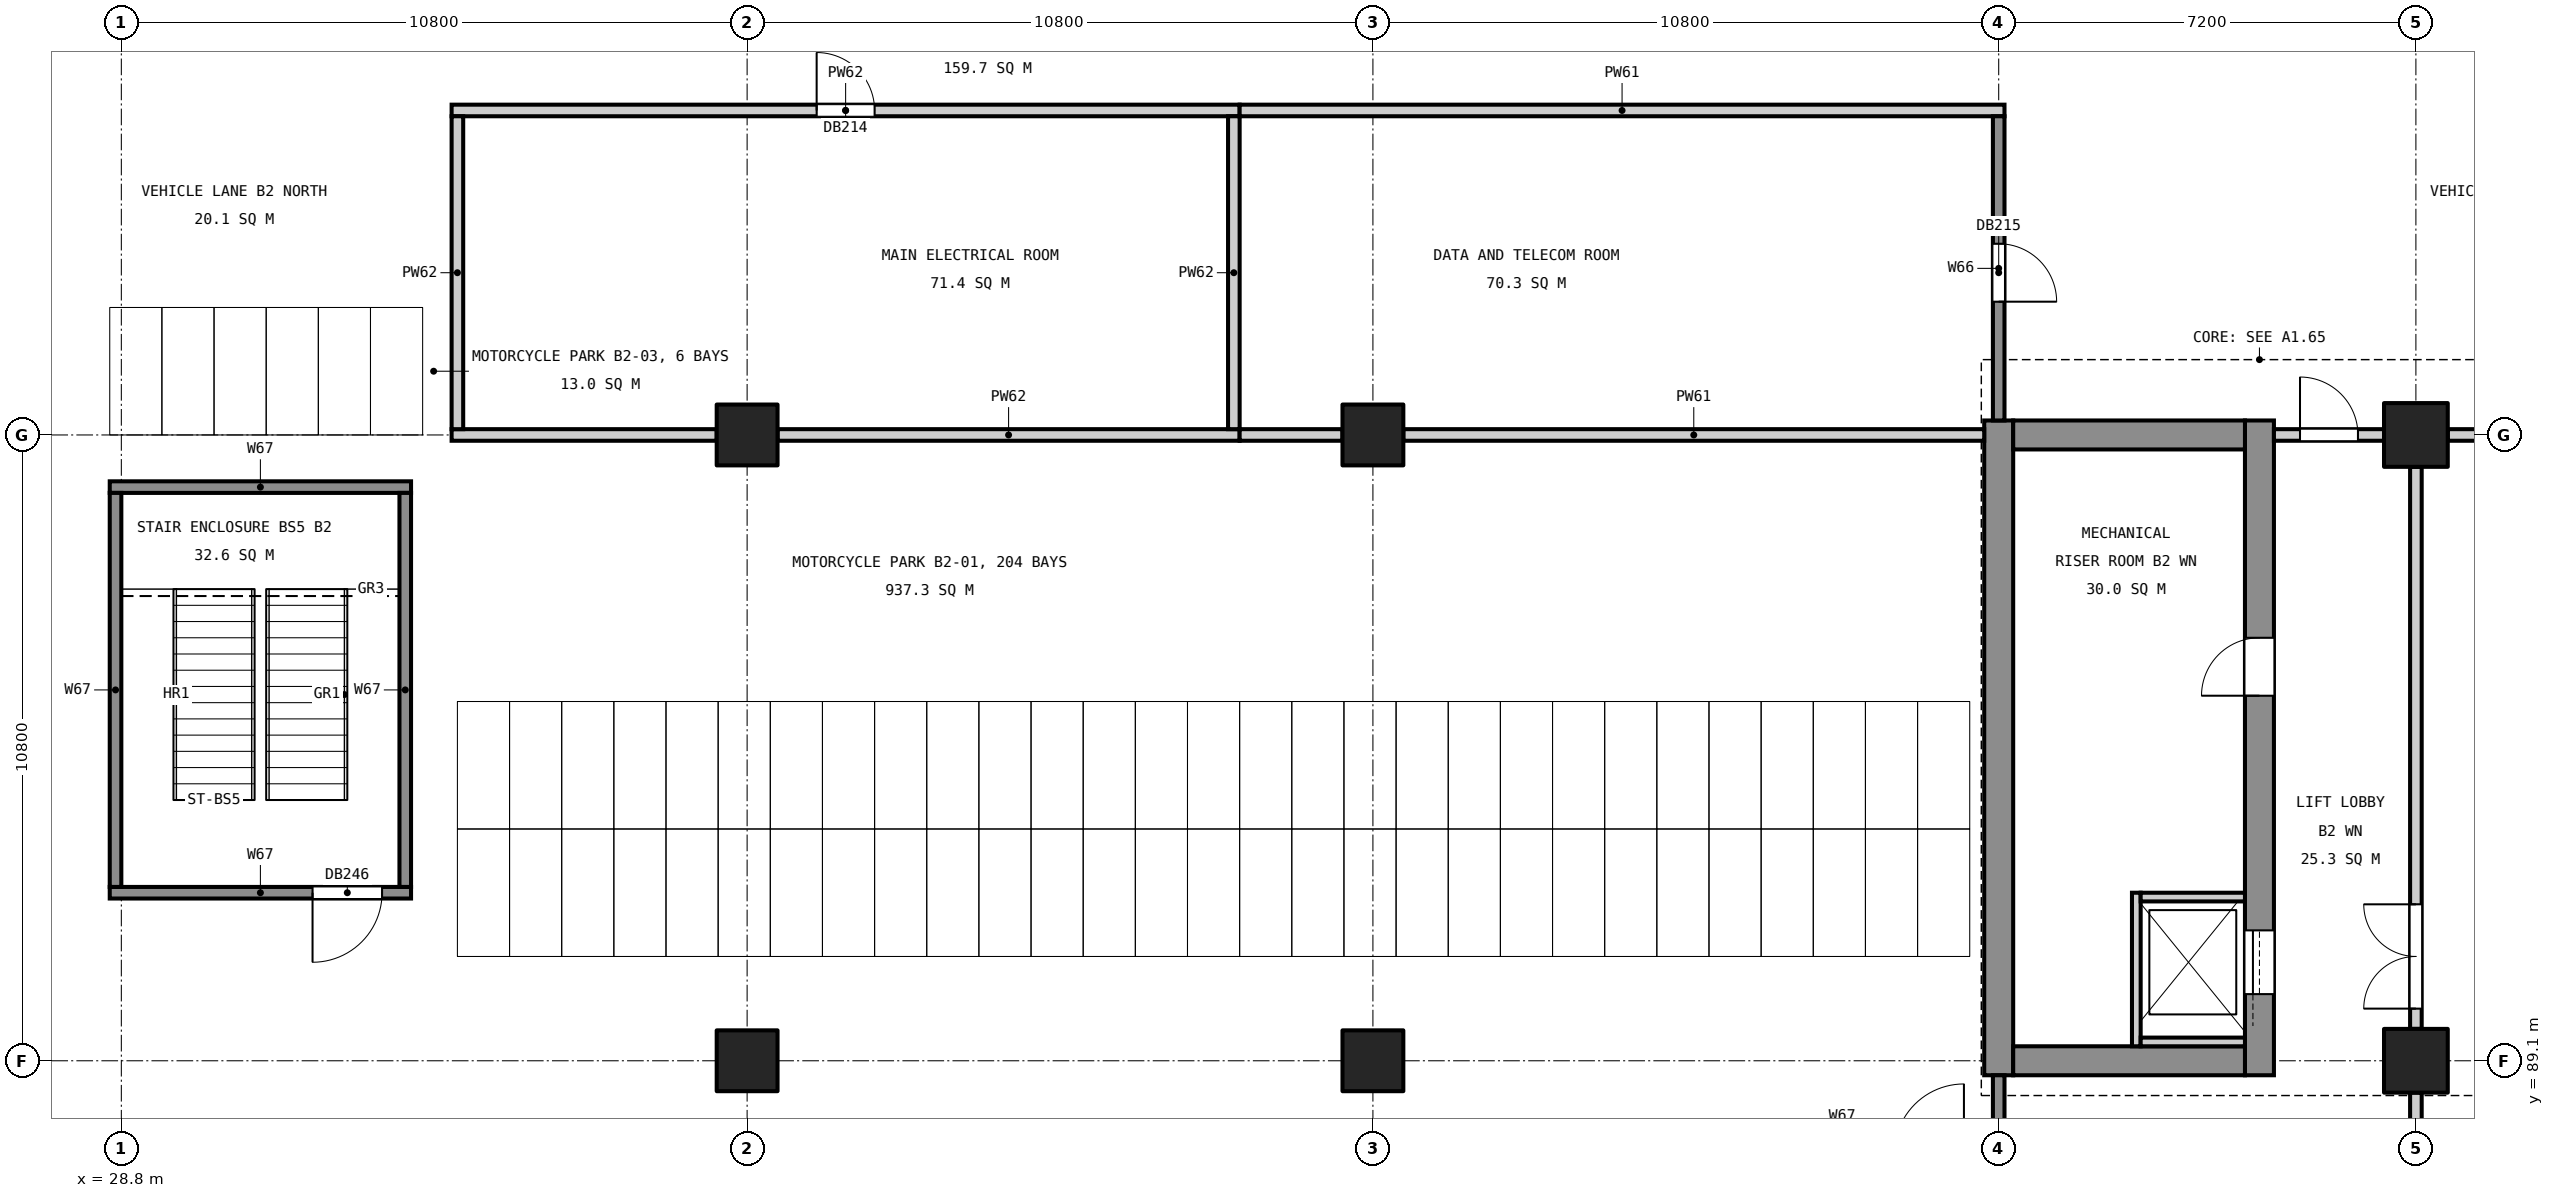
"""IFC4 building model, lengths in metres.
Left out: names, types, materials, properties, quantities, classifications, styles, units other than length and angle.
Written with IfcOpenShell. Run it as: python <this file> out.ifc"""

import sys

from ifc_helpers import new_model, si_unit, direction, frame, frame_2d, origin, origin_2d, place, context, subcontext, project, spatial, rectangle, extrude, element, fill, save


model = new_model("IFC4")
c1 = context("Model", 3, precision=1e-05, world=origin(), true_north=direction((0.0, 1.0)))
c2 = subcontext(c1, "Body", "Model", "MODEL_VIEW")
j1 = project(units=[si_unit("LENGTHUNIT", "METRE"), si_unit("PLANEANGLEUNIT", "RADIAN")], contexts=[c1])
p1 = place(None, origin())
s1 = spatial("IfcSite", under=j1, at=p1, CompositionType="ELEMENT")
p2 = place(p1, origin())
s2 = spatial("IfcBuilding", under=s1, at=p2, CompositionType="ELEMENT")
p3 = place(p2, frame((0.0, 0.0, -9.6)))
s3 = spatial("IfcBuildingStorey", under=s2, at=p3, CompositionType="ELEMENT", Elevation=-9.6)
for number, where, z_axis, x_axis in (
    (1, (68.4, 89.1, 0.0), (0.0, 0.0, 1.0), (1.0, 0.0, 0.0)),
    (2, (68.4, 99.9, 0.0), (0.0, 0.0, 1.0), (1.0, 0.0, 0.0)),
):
    element("IfcColumn", number, at=place(p3, frame(where, z_axis=z_axis, x_axis=x_axis)), inside=s3, PredefinedType="COLUMN", context=c2, shape_type="SweptSolid", body=[
        extrude(rectangle(XDim=1.1, YDim=1.1, at=origin_2d()), origin(), (0.0, 0.0, 1.0), 4.35),
    ])
for number, where, z_axis, x_axis in (
    (3, (39.6, 89.1, 0.0), (0.0, 0.0, 1.0), (1.0, 0.0, 0.0)),
    (4, (39.6, 99.9, 0.0), (0.0, 0.0, 1.0), (1.0, 0.0, 0.0)),
    (5, (50.4, 89.1, 0.0), (0.0, 0.0, 1.0), (1.0, 0.0, 0.0)),
    (6, (50.4, 99.9, 0.0), (0.0, 0.0, 1.0), (1.0, 0.0, 0.0)),
):
    element("IfcColumn", number, at=place(p3, frame(where, z_axis=z_axis, x_axis=x_axis)), inside=s3, PredefinedType="COLUMN", context=c2, shape_type="SweptSolid", body=[
        extrude(rectangle(XDim=1.05, YDim=1.05, at=origin_2d()), origin(), (0.0, 0.0, 1.0), 4.35),
    ])
p4 = place(p3, frame((61.2, 88.85, 0.0), z_axis=(0.0, 0.0, 1.0), x_axis=(0.0, 1.0, 0.0)))
e7 = element("IfcWall", 7, at=p4, inside=s3, PredefinedType="SHEAR", context=c2, shape_type="SweptSolid", body=[
    extrude(rectangle(XDim=11.3, YDim=0.5, at=frame_2d((5.65, 0.0))), origin(), (0.0, 0.0, 1.0), 4.35),
])
p5 = place(p3, frame((65.7, 88.85, 0.0), z_axis=(0.0, 0.0, 1.0), x_axis=(0.0, 1.0, 0.0)))
e8 = element("IfcWall", 8, at=p5, inside=s3, PredefinedType="SHEAR", context=c2, shape_type="SweptSolid", body=[
    extrude(rectangle(XDim=11.3, YDim=0.5, at=frame_2d((5.65, 0.0))), origin(), (0.0, 0.0, 1.0), 4.35),
])
p6 = place(p5, frame((1.4, 0.0, 0.0)))
e9 = element("IfcOpeningElement", 9, at=p6, cuts=e8, PredefinedType="OPENING", context=c2, shape_type="SweptSolid", body=[
    extrude(rectangle(XDim=1.1, YDim=2.1, at=frame_2d((0.55, 1.05))), frame((0.0, 0.26, 0.0), z_axis=(0.0, -1.0, 0.0), x_axis=(1.0, 0.0, 0.0)), (0.0, 0.0, 1.0), 0.52),
])
p7 = place(p5, frame((6.55, 0.0, 0.0)))
e10 = element("IfcOpeningElement", 10, at=p7, cuts=e8, PredefinedType="OPENING", context=c2, shape_type="SweptSolid", body=[
    extrude(rectangle(XDim=1.0, YDim=2.1, at=frame_2d((0.5, 1.05))), frame((0.0, 0.26, 0.0), z_axis=(0.0, -1.0, 0.0), x_axis=(1.0, 0.0, 0.0)), (0.0, 0.0, 1.0), 0.52),
])
for number, where, z_axis, x_axis in (
    (11, (61.45, 89.1, 0.0), (0.0, 0.0, 1.0), (1.0, 0.0, 0.0)),
    (12, (61.45, 99.9, 0.0), (0.0, 0.0, 1.0), (1.0, 0.0, 0.0)),
):
    element("IfcWall", number, at=place(p3, frame(where, z_axis=z_axis, x_axis=x_axis)), inside=s3, PredefinedType="SHEAR", context=c2, shape_type="SweptSolid", body=[
        extrude(rectangle(XDim=4.0, YDim=0.5, at=frame_2d((2.0, 0.0))), origin(), (0.0, 0.0, 1.0), 4.35),
    ])
p8 = place(p2, frame((0.0, 0.0, -4.8)))
s4 = spatial("IfcBuildingStorey", under=s2, at=p8, CompositionType="ELEMENT", Elevation=-4.8)
for number, where, z_axis, x_axis in (
    (13, (28.2, 84.9, -18.2), (0.0, 0.0, 1.0), (0.0, 1.0, 0.0)),
    (14, (28.2, 90.7, -18.2), (0.0, 0.0, 1.0), (0.0, 1.0, 0.0)),
    (15, (28.2, 96.5, -18.2), (0.0, 0.0, 1.0), (0.0, 1.0, 0.0)),
    (16, (28.2, 102.3, -18.2), (0.0, 0.0, 1.0), (0.0, 1.0, 0.0)),
):
    element("IfcWall", number, at=place(p8, frame(where, z_axis=z_axis, x_axis=x_axis)), inside=s4, PredefinedType="SOLIDWALL", context=c2, shape_type="SweptSolid", body=[
        extrude(rectangle(XDim=5.8, YDim=0.8, at=frame_2d((2.9, 0.0))), origin(), (0.0, 0.0, 1.0), 21.55),
    ])
p9 = place(p3, frame((63.575, 92.0, 0.0), z_axis=(0.0, 0.0, 1.0), x_axis=(0.0, -1.0, 0.0)))
e17 = element("IfcWall", 17, at=p9, inside=s3, PredefinedType="SOLIDWALL", context=c2, shape_type="SweptSolid", body=[
    extrude(rectangle(XDim=2.65, YDim=0.15, at=frame_2d((1.325, 0.0))), origin(), (0.0, 0.0, 1.0), 4.8),
])
for number, where, z_axis, x_axis in (
    (18, (63.65, 91.925, 0.0), (0.0, 0.0, 1.0), (1.0, 0.0, 0.0)),
    (19, (63.65, 89.425, 0.0), (0.0, 0.0, 1.0), (1.0, 0.0, 0.0)),
):
    element("IfcWall", number, at=place(p3, frame(where, z_axis=z_axis, x_axis=x_axis)), inside=s3, PredefinedType="SOLIDWALL", context=c2, shape_type="SweptSolid", body=[
        extrude(rectangle(XDim=1.8, YDim=0.15, at=frame_2d((0.9, 0.0))), origin(), (0.0, 0.0, 1.0), 4.8),
    ])
p10 = place(p3, frame((28.6, 92.0, 0.0), z_axis=(0.0, 0.0, 1.0), x_axis=(1.0, 0.0, 0.0)))
e20 = element("IfcWall", 20, at=p10, inside=s3, PredefinedType="SOLIDWALL", context=c2, shape_type="SweptSolid", body=[
    extrude(rectangle(XDim=5.2, YDim=0.2, at=frame_2d((2.6, 0.0))), origin(), (0.0, 0.0, 1.0), 4.35),
])
p11 = place(p10, frame((3.5, 0.0, 0.0)))
e21 = element("IfcOpeningElement", 21, at=p11, cuts=e20, PredefinedType="OPENING", context=c2, shape_type="SweptSolid", body=[
    extrude(rectangle(XDim=1.2, YDim=2.1, at=frame_2d((0.6, 1.05))), frame((0.0, 0.11, 0.0), z_axis=(0.0, -1.0, 0.0), x_axis=(1.0, 0.0, 0.0)), (0.0, 0.0, 1.0), 0.22),
])
p12 = place(p3, frame((28.6, 99.0, 0.0), z_axis=(0.0, 0.0, 1.0), x_axis=(1.0, 0.0, 0.0)))
e22 = element("IfcWall", 22, at=p12, inside=s3, PredefinedType="SOLIDWALL", context=c2, shape_type="SweptSolid", body=[
    extrude(rectangle(XDim=5.2, YDim=0.2, at=frame_2d((2.6, 0.0))), origin(), (0.0, 0.0, 1.0), 4.35),
])
p13 = place(p3, frame((34.5, 99.9, 0.0), z_axis=(0.0, 0.0, 1.0), x_axis=(1.0, 0.0, 0.0)))
e23 = element("IfcWall", 23, at=p13, inside=s3, PredefinedType="PARTITIONING", context=c2, shape_type="SweptSolid", body=[
    extrude(rectangle(XDim=4.575, YDim=0.2, at=frame_2d((2.288, 0.0))), origin(), (0.0, 0.0, 1.0), 4.35),
])
p14 = place(p3, frame((40.125, 99.9, 0.0), z_axis=(0.0, 0.0, 1.0), x_axis=(1.0, 0.0, 0.0)))
e24 = element("IfcWall", 24, at=p14, inside=s3, PredefinedType="PARTITIONING", context=c2, shape_type="SweptSolid", body=[
    extrude(rectangle(XDim=7.975, YDim=0.2, at=frame_2d((3.988, 0.0))), origin(), (0.0, 0.0, 1.0), 4.35),
])
p15 = place(p3, frame((48.1, 99.9, 0.0), z_axis=(0.0, 0.0, 1.0), x_axis=(1.0, 0.0, 0.0)))
e25 = element("IfcWall", 25, at=p15, inside=s3, PredefinedType="PARTITIONING", context=c2, shape_type="SweptSolid", body=[
    extrude(rectangle(XDim=1.775, YDim=0.2, at=frame_2d((0.887, 0.0))), origin(), (0.0, 0.0, 1.0), 4.35),
])
p16 = place(p3, frame((50.925, 99.9, 0.0), z_axis=(0.0, 0.0, 1.0), x_axis=(1.0, 0.0, 0.0)))
e26 = element("IfcWall", 26, at=p16, inside=s3, PredefinedType="PARTITIONING", context=c2, shape_type="SweptSolid", body=[
    extrude(rectangle(XDim=10.025, YDim=0.2, at=frame_2d((5.012, 0.0))), origin(), (0.0, 0.0, 1.0), 4.35),
])
p17 = place(p3, frame((65.95, 99.9, 0.0), z_axis=(0.0, 0.0, 1.0), x_axis=(1.0, 0.0, 0.0)))
e27 = element("IfcWall", 27, at=p17, inside=s3, PredefinedType="PARTITIONING", context=c2, shape_type="SweptSolid", body=[
    extrude(rectangle(XDim=1.9, YDim=0.2, at=frame_2d((0.95, 0.0))), origin(), (0.0, 0.0, 1.0), 4.35),
])
p18 = place(p17, frame((0.45, 0.0, 0.0)))
e28 = element("IfcOpeningElement", 28, at=p18, cuts=e27, PredefinedType="OPENING", context=c2, shape_type="SweptSolid", body=[
    extrude(rectangle(XDim=1.0, YDim=2.1, at=frame_2d((0.5, 1.05))), frame((0.0, 0.11, 0.0), z_axis=(0.0, -1.0, 0.0), x_axis=(1.0, 0.0, 0.0)), (0.0, 0.0, 1.0), 0.22),
])
p19 = place(p3, frame((68.95, 99.9, 0.0), z_axis=(0.0, 0.0, 1.0), x_axis=(1.0, 0.0, 0.0)))
e29 = element("IfcWall", 29, at=p19, inside=s3, PredefinedType="PARTITIONING", context=c2, shape_type="SweptSolid", body=[
    extrude(rectangle(XDim=9.7, YDim=0.2, at=frame_2d((4.85, 0.0))), origin(), (0.0, 0.0, 1.0), 4.35),
])
p20 = place(p3, frame((34.5, 105.5, 0.0), z_axis=(0.0, 0.0, 1.0), x_axis=(1.0, 0.0, 0.0)))
e30 = element("IfcWall", 30, at=p20, inside=s3, PredefinedType="PARTITIONING", context=c2, shape_type="SweptSolid", body=[
    extrude(rectangle(XDim=13.6, YDim=0.2, at=frame_2d((6.8, 0.0))), origin(), (0.0, 0.0, 1.0), 4.35),
])
p21 = place(p20, frame((6.3, 0.0, 0.0)))
e31 = element("IfcOpeningElement", 31, at=p21, cuts=e30, PredefinedType="OPENING", context=c2, shape_type="SweptSolid", body=[
    extrude(rectangle(XDim=1.0, YDim=2.1, at=frame_2d((0.5, 1.05))), frame((0.0, 0.11, 0.0), z_axis=(0.0, -1.0, 0.0), x_axis=(1.0, 0.0, 0.0)), (0.0, 0.0, 1.0), 0.22),
])
p22 = place(p3, frame((48.1, 105.5, 0.0), z_axis=(0.0, 0.0, 1.0), x_axis=(1.0, 0.0, 0.0)))
e32 = element("IfcWall", 32, at=p22, inside=s3, PredefinedType="PARTITIONING", context=c2, shape_type="SweptSolid", body=[
    extrude(rectangle(XDim=13.2, YDim=0.2, at=frame_2d((6.6, 0.0))), origin(), (0.0, 0.0, 1.0), 4.35),
])
for number, where, z_axis, x_axis in (
    (33, (28.7, 92.1, 0.0), (0.0, 0.0, 1.0), (0.0, 1.0, 0.0)),
    (34, (33.7, 92.1, 0.0), (0.0, 0.0, 1.0), (0.0, 1.0, 0.0)),
):
    element("IfcWall", number, at=place(p3, frame(where, z_axis=z_axis, x_axis=x_axis)), inside=s3, PredefinedType="SOLIDWALL", context=c2, shape_type="SweptSolid", body=[
        extrude(rectangle(XDim=6.8, YDim=0.2, at=frame_2d((3.4, 0.0))), origin(), (0.0, 0.0, 1.0), 4.35),
    ])
for number, where, z_axis, x_axis in (
    (35, (34.6, 100.0, 0.0), (0.0, 0.0, 1.0), (0.0, 1.0, 0.0)),
    (36, (48.0, 100.0, 0.0), (0.0, 0.0, 1.0), (0.0, 1.0, 0.0)),
):
    element("IfcWall", number, at=place(p3, frame(where, z_axis=z_axis, x_axis=x_axis)), inside=s3, PredefinedType="PARTITIONING", context=c2, shape_type="SweptSolid", body=[
        extrude(rectangle(XDim=5.4, YDim=0.2, at=frame_2d((2.7, 0.0))), origin(), (0.0, 0.0, 1.0), 4.35),
    ])
p23 = place(p3, frame((61.2, 78.85, 0.0), z_axis=(0.0, 0.0, 1.0), x_axis=(0.0, 1.0, 0.0)))
e37 = element("IfcWall", 37, at=p23, inside=s3, PredefinedType="SOLIDWALL", context=c2, shape_type="SweptSolid", body=[
    extrude(rectangle(XDim=10.0, YDim=0.2, at=frame_2d((5.0, 0.0))), origin(), (0.0, 0.0, 1.0), 4.35),
])
p24 = place(p3, frame((61.2, 100.15, 0.0), z_axis=(0.0, 0.0, 1.0), x_axis=(0.0, 1.0, 0.0)))
e38 = element("IfcWall", 38, at=p24, inside=s3, PredefinedType="SOLIDWALL", context=c2, shape_type="SweptSolid", body=[
    extrude(rectangle(XDim=5.25, YDim=0.2, at=frame_2d((2.625, 0.0))), origin(), (0.0, 0.0, 1.0), 4.35),
])
p25 = place(p24, frame((2.05, 0.0, 0.0)))
e39 = element("IfcOpeningElement", 39, at=p25, cuts=e38, PredefinedType="OPENING", context=c2, shape_type="SweptSolid", body=[
    extrude(rectangle(XDim=1.0, YDim=2.1, at=frame_2d((0.5, 1.05))), frame((0.0, 0.11, 0.0), z_axis=(0.0, -1.0, 0.0), x_axis=(1.0, 0.0, 0.0)), (0.0, 0.0, 1.0), 0.22),
])
p26 = place(p3, frame((68.4, 82.0, 0.0), z_axis=(0.0, 0.0, 1.0), x_axis=(0.0, 1.0, 0.0)))
e40 = element("IfcWall", 40, at=p26, inside=s3, PredefinedType="PARTITIONING", context=c2, shape_type="SweptSolid", body=[
    extrude(rectangle(XDim=6.55, YDim=0.2, at=frame_2d((3.275, 0.0))), origin(), (0.0, 0.0, 1.0), 4.35),
])
p27 = place(p3, frame((68.4, 89.65, 0.0), z_axis=(0.0, 0.0, 1.0), x_axis=(0.0, 1.0, 0.0)))
e41 = element("IfcWall", 41, at=p27, inside=s3, PredefinedType="PARTITIONING", context=c2, shape_type="SweptSolid", body=[
    extrude(rectangle(XDim=9.7, YDim=0.2, at=frame_2d((4.85, 0.0))), origin(), (0.0, 0.0, 1.0), 4.35),
])
p28 = place(p27, frame((0.35, 0.0, 0.0)))
e42 = element("IfcOpeningElement", 42, at=p28, cuts=e41, PredefinedType="OPENING", context=c2, shape_type="SweptSolid", body=[
    extrude(rectangle(XDim=1.8, YDim=2.1, at=frame_2d((0.9, 1.05))), frame((0.0, 0.11, 0.0), z_axis=(0.0, -1.0, 0.0), x_axis=(1.0, 0.0, 0.0)), (0.0, 0.0, 1.0), 0.22),
])
p29 = place(p6, origin())
e43 = element("IfcDoor", 43, at=p29, inside=s3, OperationType="SLIDING_TO_LEFT", PredefinedType="DOOR", context=c2, shape_type="SweptSolid", body=[
    extrude(rectangle(XDim=1.1, YDim=2.1, at=frame_2d((0.55, 1.05))), frame((0.0, 0.025, 0.0), z_axis=(0.0, -1.0, 0.0), x_axis=(1.0, 0.0, 0.0)), (0.0, 0.0, 1.0), 0.05),
])
fill(e9, e43)
p30 = place(p21, origin())
e44 = element("IfcDoor", 44, at=p30, inside=s3, OperationType="SINGLE_SWING_LEFT", PredefinedType="DOOR", context=c2, shape_type="SweptSolid", body=[
    extrude(rectangle(XDim=1.0, YDim=2.1, at=frame_2d((0.5, 1.05))), frame((0.0, 0.025, 0.0), z_axis=(0.0, -1.0, 0.0), x_axis=(1.0, 0.0, 0.0)), (0.0, 0.0, 1.0), 0.05),
])
fill(e31, e44)
p31 = place(p25, frame((1.0, 0.0, 0.0), z_axis=(0.0, 0.0, 1.0), x_axis=(-1.0, 0.0, 0.0)))
e45 = element("IfcDoor", 45, at=p31, inside=s3, OperationType="SINGLE_SWING_RIGHT", PredefinedType="DOOR", context=c2, shape_type="SweptSolid", body=[
    extrude(rectangle(XDim=1.0, YDim=2.1, at=frame_2d((0.5, 1.05))), frame((0.0, 0.025, 0.0), z_axis=(0.0, -1.0, 0.0), x_axis=(1.0, 0.0, 0.0)), (0.0, 0.0, 1.0), 0.05),
])
fill(e39, e45)
p32 = place(p28, origin())
e46 = element("IfcDoor", 46, at=p32, inside=s3, OperationType="DOUBLE_DOOR_SINGLE_SWING", PredefinedType="DOOR", context=c2, shape_type="SweptSolid", body=[
    extrude(rectangle(XDim=1.8, YDim=2.1, at=frame_2d((0.9, 1.05))), frame((0.0, 0.025, 0.0), z_axis=(0.0, -1.0, 0.0), x_axis=(1.0, 0.0, 0.0)), (0.0, 0.0, 1.0), 0.05),
])
fill(e42, e46)
p33 = place(p18, origin())
e47 = element("IfcDoor", 47, at=p33, inside=s3, OperationType="SINGLE_SWING_LEFT", PredefinedType="DOOR", context=c2, shape_type="SweptSolid", body=[
    extrude(rectangle(XDim=1.0, YDim=2.1, at=frame_2d((0.5, 1.05))), frame((0.0, 0.025, 0.0), z_axis=(0.0, -1.0, 0.0), x_axis=(1.0, 0.0, 0.0)), (0.0, 0.0, 1.0), 0.05),
])
fill(e28, e47)
p34 = place(p7, origin())
e48 = element("IfcDoor", 48, at=p34, inside=s3, OperationType="SINGLE_SWING_LEFT", PredefinedType="DOOR", context=c2, shape_type="SweptSolid", body=[
    extrude(rectangle(XDim=1.0, YDim=2.1, at=frame_2d((0.5, 1.05))), frame((0.0, 0.025, 0.0), z_axis=(0.0, -1.0, 0.0), x_axis=(1.0, 0.0, 0.0)), (0.0, 0.0, 1.0), 0.05),
])
fill(e10, e48)
p35 = place(p11, frame((1.2, 0.0, 0.0), z_axis=(0.0, 0.0, 1.0), x_axis=(-1.0, 0.0, 0.0)))
e49 = element("IfcDoor", 49, at=p35, inside=s3, OperationType="SINGLE_SWING_RIGHT", PredefinedType="DOOR", context=c2, shape_type="SweptSolid", body=[
    extrude(rectangle(XDim=1.2, YDim=2.1, at=frame_2d((0.6, 1.05))), frame((0.0, 0.025, 0.0), z_axis=(0.0, -1.0, 0.0), x_axis=(1.0, 0.0, 0.0)), (0.0, 0.0, 1.0), 0.05),
])
fill(e21, e49)
save(model, sys.argv[1])
